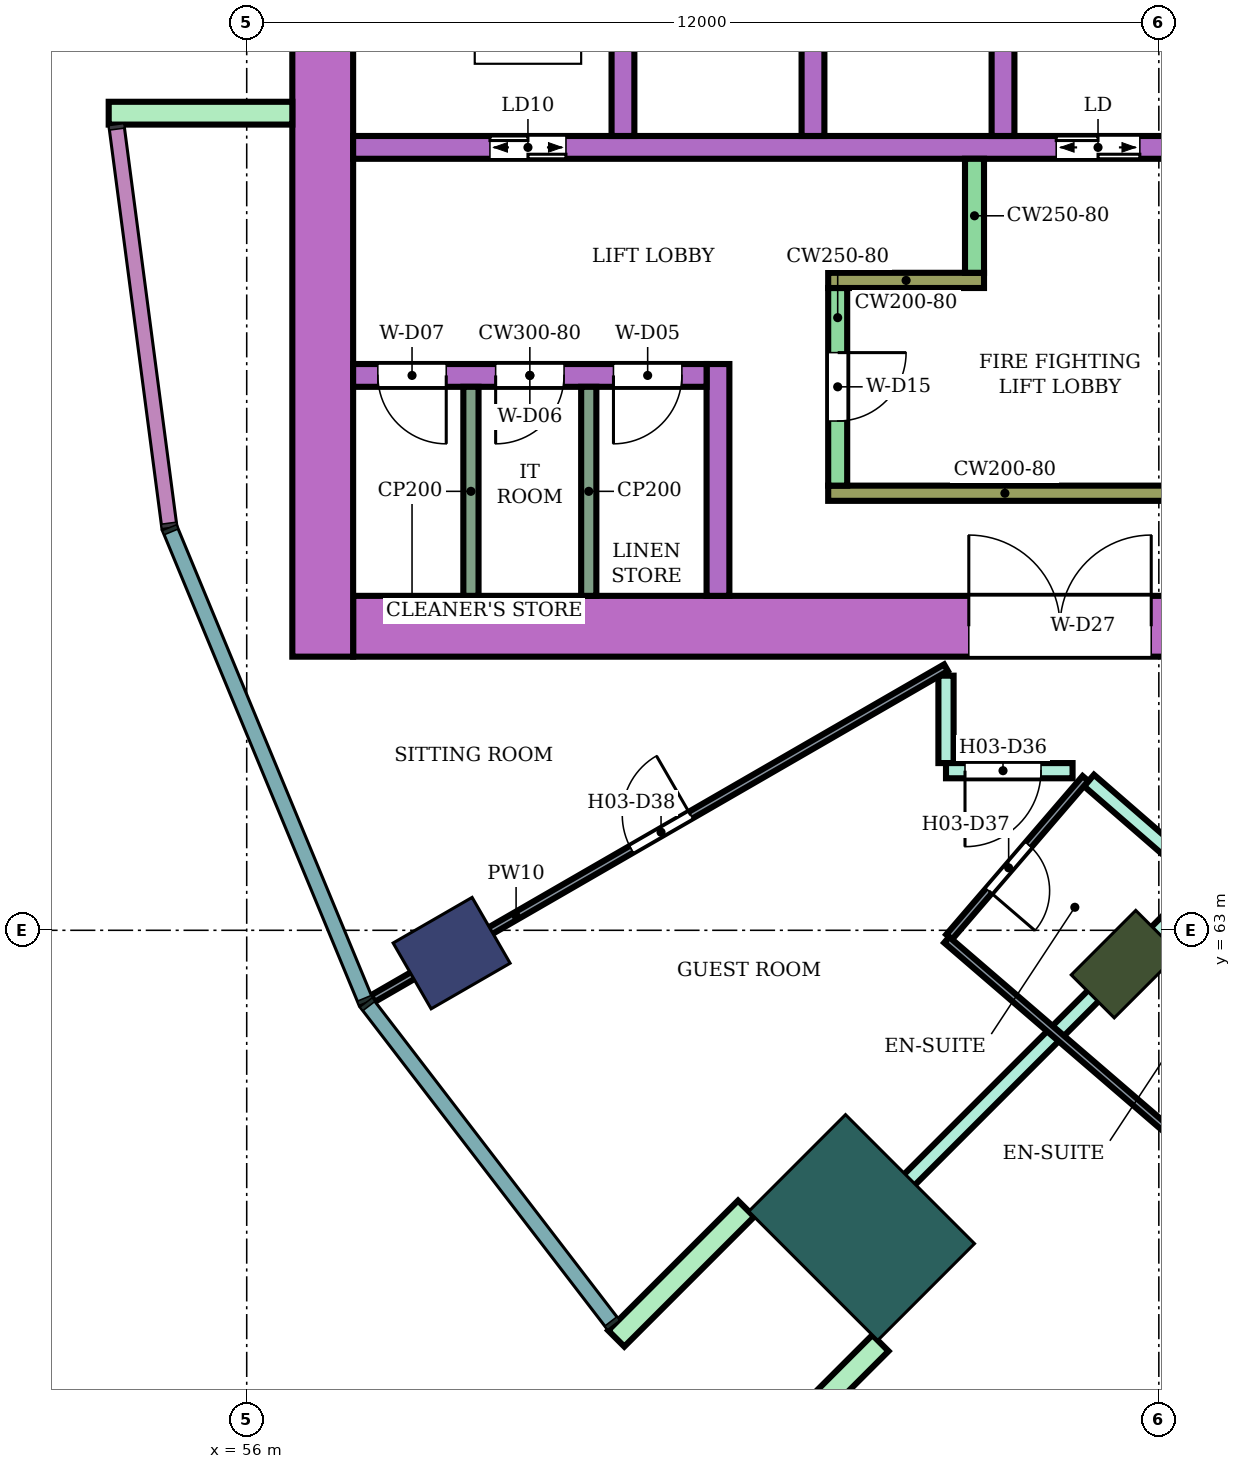
"""IFC4 building model, lengths in metres.
Left out: names, types, materials, properties, quantities, classifications, styles, units other than length and angle.
Written with IfcOpenShell. Run it as: python <this file> out.ifc"""

import sys

from ifc_helpers import new_model, si_unit, direction, frame, frame_2d, origin, origin_2d, place, context, subcontext, project, spatial, rectangle, extrude, element, fill, save


model = new_model("IFC4")
c1 = context("Model", 3, precision=1e-05, world=origin(), true_north=direction((0.0, 1.0)))
c2 = subcontext(c1, "Body", "Model", "MODEL_VIEW")
j1 = project(units=[si_unit("LENGTHUNIT", "METRE"), si_unit("PLANEANGLEUNIT", "RADIAN")], contexts=[c1])
p1 = place(None, origin())
s1 = spatial("IfcSite", under=j1, at=p1, CompositionType="ELEMENT")
p2 = place(p1, origin())
s2 = spatial("IfcBuilding", under=s1, at=p2, CompositionType="ELEMENT")
p3 = place(p2, frame((0.0, 0.0, 59.2)))
s3 = spatial("IfcBuildingStorey", under=s2, at=p3, CompositionType="ELEMENT", Elevation=59.2)
p4 = place(p3, frame((58.696, 62.7, 0.0), z_axis=(0.0, 0.0, 1.0), x_axis=(-0.866025403784, -0.5, 0.0)))
e1 = element("IfcColumn", 1, at=p4, inside=s3, PredefinedType="COLUMN", context=c2, shape_type="SweptSolid", body=[
    extrude(rectangle(XDim=1.2, YDim=1.0, at=origin_2d()), origin(), (0.0, 0.0, 1.0), 3.8),
])
p5 = place(p3, frame((67.555, 62.555, 0.0), z_axis=(0.0, 0.0, 1.0), x_axis=(-0.707106781187, -0.707106781187, 0.0)))
e2 = element("IfcColumn", 2, at=p5, inside=s3, PredefinedType="COLUMN", context=c2, shape_type="SweptSolid", body=[
    extrude(rectangle(XDim=1.2, YDim=0.8, at=origin_2d()), origin(), (0.0, 0.0, 1.0), 3.8),
])
p6 = place(p3, frame((64.09, 59.09, 0.0), z_axis=(0.0, 0.0, 1.0), x_axis=(-0.707106781187, -0.707106781187, 0.0)))
e3 = element("IfcColumn", 3, at=p6, inside=s3, PredefinedType="COLUMN", context=c2, shape_type="SweptSolid", body=[
    extrude(rectangle(XDim=1.8, YDim=2.4, at=origin_2d()), origin(), (0.0, 0.0, 1.0), 3.8),
])
p7 = place(p3, frame((72.1, 67.0, 0.0), z_axis=(0.0, 0.0, 1.0), x_axis=(-1.0, 0.0, 0.0)))
e4 = element("IfcWall", 4, at=p7, inside=s3, PredefinedType="SHEAR", context=c2, shape_type="SweptSolid", body=[
    extrude(rectangle(XDim=14.7, YDim=0.8, at=frame_2d((7.35, 0.0))), origin(), (0.0, 0.0, 1.0), 3.48),
])
p8 = place(p7, frame((4.2, 0.0, 0.0)))
e5 = element("IfcOpeningElement", 5, at=p8, cuts=e4, PredefinedType="OPENING", context=c2, shape_type="SweptSolid", body=[
    extrude(rectangle(XDim=2.4, YDim=2.4, at=frame_2d((1.2, 1.2))), frame((0.0, 0.41, 0.0), z_axis=(0.0, -1.0, 0.0), x_axis=(1.0, 0.0, 0.0)), (0.0, 0.0, 1.0), 0.82),
])
p9 = place(p3, frame((57.0, 83.4, 0.0), z_axis=(0.0, 0.0, 1.0), x_axis=(0.0, -1.0, 0.0)))
e6 = element("IfcWall", 6, at=p9, inside=s3, PredefinedType="SHEAR", context=c2, shape_type="SweptSolid", body=[
    extrude(rectangle(XDim=16.8, YDim=0.8, at=frame_2d((8.4, 0.0))), origin(), (0.0, 0.0, 1.0), 3.48),
])
p10 = place(p3, frame((68.3, 73.3, 0.0), z_axis=(0.0, 0.0, 1.0), x_axis=(-1.0, 0.0, 0.0)))
e7 = element("IfcWall", 7, at=p10, inside=s3, PredefinedType="SHEAR", context=c2, shape_type="SweptSolid", body=[
    extrude(rectangle(XDim=10.9, YDim=0.3, at=frame_2d((5.45, 0.0))), origin(), (0.0, 0.0, 1.0), 3.48),
])
p11 = place(p10, frame((0.55, 0.0, 0.0)))
e8 = element("IfcOpeningElement", 8, at=p11, cuts=e7, PredefinedType="OPENING", context=c2, shape_type="SweptSolid", body=[
    extrude(rectangle(XDim=1.1, YDim=2.1, at=frame_2d((0.55, 1.05))), frame((0.0, 0.16, 0.0), z_axis=(0.0, -1.0, 0.0), x_axis=(1.0, 0.0, 0.0)), (0.0, 0.0, 1.0), 0.32),
])
p12 = place(p10, frame((8.1, 0.0, 0.0)))
e9 = element("IfcOpeningElement", 9, at=p12, cuts=e7, PredefinedType="OPENING", context=c2, shape_type="SweptSolid", body=[
    extrude(rectangle(XDim=1.0, YDim=2.1, at=frame_2d((0.5, 1.05))), frame((0.0, 0.16, 0.0), z_axis=(0.0, -1.0, 0.0), x_axis=(1.0, 0.0, 0.0)), (0.0, 0.0, 1.0), 0.32),
])
for number, where, z_axis, x_axis in (
    (10, (65.95, 76.0, 0.0), (0.0, 0.0, 1.0), (0.0, -1.0, 0.0)),
    (11, (63.45, 76.0, 0.0), (0.0, 0.0, 1.0), (0.0, -1.0, 0.0)),
    (12, (60.95, 76.0, 0.0), (0.0, 0.0, 1.0), (0.0, -1.0, 0.0)),
):
    element("IfcWall", number, at=place(p3, frame(where, z_axis=z_axis, x_axis=x_axis)), inside=s3, PredefinedType="SHEAR", context=c2, shape_type="SweptSolid", body=[
        extrude(rectangle(XDim=2.55, YDim=0.3, at=frame_2d((1.275, 0.0))), origin(), (0.0, 0.0, 1.0), 3.48),
    ])
p13 = place(p3, frame((68.3, 68.75, 0.0), z_axis=(0.0, 0.0, 1.0), x_axis=(-1.0, 0.0, 0.0)))
e13 = element("IfcWall", 13, at=p13, inside=s3, PredefinedType="SHEAR", context=c2, shape_type="SweptSolid", body=[
    extrude(rectangle(XDim=4.65, YDim=0.2, at=frame_2d((2.325, 0.0))), origin(), (0.0, 0.0, 1.0), 3.48),
])
p14 = place(p3, frame((63.775, 71.45, 0.0), z_axis=(0.0, 0.0, 1.0), x_axis=(0.0, -1.0, 0.0)))
e14 = element("IfcWall", 14, at=p14, inside=s3, PredefinedType="SHEAR", context=c2, shape_type="SweptSolid", body=[
    extrude(rectangle(XDim=2.6, YDim=0.25, at=frame_2d((1.3, 0.0))), origin(), (0.0, 0.0, 1.0), 3.48),
])
p15 = place(p14, frame((0.85, 0.0, 0.0)))
e15 = element("IfcOpeningElement", 15, at=p15, cuts=e14, PredefinedType="OPENING", context=c2, shape_type="SweptSolid", body=[
    extrude(rectangle(XDim=0.9, YDim=2.1, at=frame_2d((0.45, 1.05))), frame((0.0, 0.135, 0.0), z_axis=(0.0, -1.0, 0.0), x_axis=(1.0, 0.0, 0.0)), (0.0, 0.0, 1.0), 0.27),
])
p16 = place(p3, frame((65.7, 71.55, 0.0), z_axis=(0.0, 0.0, 1.0), x_axis=(-1.0, 0.0, 0.0)))
e16 = element("IfcWall", 16, at=p16, inside=s3, PredefinedType="SHEAR", context=c2, shape_type="SweptSolid", body=[
    extrude(rectangle(XDim=2.05, YDim=0.2, at=frame_2d((1.025, 0.0))), origin(), (0.0, 0.0, 1.0), 3.48),
])
p17 = place(p3, frame((65.575, 73.15, 0.0), z_axis=(0.0, 0.0, 1.0), x_axis=(0.0, -1.0, 0.0)))
e17 = element("IfcWall", 17, at=p17, inside=s3, PredefinedType="SHEAR", context=c2, shape_type="SweptSolid", body=[
    extrude(rectangle(XDim=1.5, YDim=0.25, at=frame_2d((0.75, 0.0))), origin(), (0.0, 0.0, 1.0), 3.48),
])
p18 = place(p3, frame((62.2, 70.45, 0.0), z_axis=(0.0, 0.0, 1.0), x_axis=(0.0, -1.0, 0.0)))
e18 = element("IfcWall", 18, at=p18, inside=s3, PredefinedType="SHEAR", context=c2, shape_type="SweptSolid", body=[
    extrude(rectangle(XDim=3.05, YDim=0.3, at=frame_2d((1.525, 0.0))), origin(), (0.0, 0.0, 1.0), 3.48),
])
p19 = place(p3, frame((62.05, 70.3, 0.0), z_axis=(0.0, 0.0, 1.0), x_axis=(-1.0, 0.0, 0.0)))
e19 = element("IfcWall", 19, at=p19, inside=s3, PredefinedType="SHEAR", context=c2, shape_type="SweptSolid", body=[
    extrude(rectangle(XDim=4.65, YDim=0.3, at=frame_2d((2.325, 0.0))), origin(), (0.0, 0.0, 1.0), 3.48),
])
p20 = place(p19, frame((0.325, 0.0, 0.0)))
e20 = element("IfcOpeningElement", 20, at=p20, cuts=e19, PredefinedType="OPENING", context=c2, shape_type="SweptSolid", body=[
    extrude(rectangle(XDim=0.9, YDim=2.1, at=frame_2d((0.45, 1.05))), frame((0.0, 0.16, 0.0), z_axis=(0.0, -1.0, 0.0), x_axis=(1.0, 0.0, 0.0)), (0.0, 0.0, 1.0), 0.32),
])
p21 = place(p19, frame((1.875, 0.0, 0.0)))
e21 = element("IfcOpeningElement", 21, at=p21, cuts=e19, PredefinedType="OPENING", context=c2, shape_type="SweptSolid", body=[
    extrude(rectangle(XDim=0.9, YDim=2.1, at=frame_2d((0.45, 1.05))), frame((0.0, 0.16, 0.0), z_axis=(0.0, -1.0, 0.0), x_axis=(1.0, 0.0, 0.0)), (0.0, 0.0, 1.0), 0.32),
])
p22 = place(p19, frame((3.425, 0.0, 0.0)))
e22 = element("IfcOpeningElement", 22, at=p22, cuts=e19, PredefinedType="OPENING", context=c2, shape_type="SweptSolid", body=[
    extrude(rectangle(XDim=0.9, YDim=2.1, at=frame_2d((0.45, 1.05))), frame((0.0, 0.16, 0.0), z_axis=(0.0, -1.0, 0.0), x_axis=(1.0, 0.0, 0.0)), (0.0, 0.0, 1.0), 0.32),
])
for number, where, z_axis, x_axis in (
    (23, (56.6, 73.75, 0.0), (0.0, 0.0, 1.0), (-1.0, 0.0, 0.0)),
    (24, (62.57, 59.338, 0.0), (0.0, 0.0, 1.0), (-0.707, -0.707, 0.0)),
    (25, (64.338, 57.57, 0.0), (0.0, 0.0, 1.0), (-0.707, -0.707, 0.0)),
):
    element("IfcWall", number, at=place(p3, frame(where, z_axis=z_axis, x_axis=x_axis)), inside=s3, PredefinedType="NOTDEFINED", context=c2, shape_type="SweptSolid", body=[
        extrude(rectangle(XDim=2.416, YDim=0.3, at=frame_2d((1.208, 0.0))), origin(), (0.0, 0.0, 1.0), 3.8),
    ])
p23 = place(p3, frame((63.596, 58.596, 0.0), z_axis=(0.0, 0.0, 1.0), x_axis=(0.707106781187, 0.707106781187, 0.0)))
e26 = element("IfcWall", 26, at=p23, inside=s3, PredefinedType="PARTITIONING", context=c2, shape_type="SweptSolid", body=[
    extrude(rectangle(XDim=7.005, YDim=0.2, at=frame_2d((3.503, 0.0))), origin(), (0.0, 0.0, 1.0), 3.35),
])
p24 = place(p3, frame((65.2, 65.2, 0.0), z_axis=(0.0, 0.0, 1.0), x_axis=(0.0, 1.0, 0.0)))
e27 = element("IfcWall", 27, at=p24, inside=s3, PredefinedType="PARTITIONING", context=c2, shape_type="SweptSolid", body=[
    extrude(rectangle(XDim=1.15, YDim=0.2, at=frame_2d((0.575, 0.0))), origin(), (0.0, 0.0, 1.0), 3.35),
])
p25 = place(p3, frame((65.2, 65.1, 0.0), z_axis=(0.0, 0.0, 1.0), x_axis=(1.0, 0.0, 0.0)))
e28 = element("IfcWall", 28, at=p25, inside=s3, PredefinedType="PARTITIONING", context=c2, shape_type="SweptSolid", body=[
    extrude(rectangle(XDim=1.665, YDim=0.2, at=frame_2d((0.833, 0.0))), origin(), (0.0, 0.0, 1.0), 3.35),
])
p26 = place(p25, frame((0.25, 0.0, 0.0)))
e29 = element("IfcOpeningElement", 29, at=p26, cuts=e28, PredefinedType="OPENING", context=c2, shape_type="SweptSolid", body=[
    extrude(rectangle(XDim=1.0, YDim=2.1, at=frame_2d((0.5, 1.05))), frame((0.0, 0.11, 0.0), z_axis=(0.0, -1.0, 0.0), x_axis=(1.0, 0.0, 0.0)), (0.0, 0.0, 1.0), 0.22),
])
p27 = place(p3, frame((67.081, 64.971, 0.0), z_axis=(0.0, 0.0, 1.0), x_axis=(0.755031061605, -0.65568902386, 0.0)))
e30 = element("IfcWall", 30, at=p27, inside=s3, PredefinedType="PARTITIONING", context=c2, shape_type="SweptSolid", body=[
    extrude(rectangle(XDim=6.186, YDim=0.2, at=frame_2d((3.093, 0.0))), origin(), (0.0, 0.0, 1.0), 3.35),
])
p28 = place(p27, frame((4.755, 0.0, 0.0)))
e31 = element("IfcOpeningElement", 31, at=p28, cuts=e30, PredefinedType="OPENING", context=c2, shape_type="SweptSolid", body=[
    extrude(rectangle(XDim=1.0, YDim=2.1, at=frame_2d((0.5, 1.05))), frame((0.0, 0.11, 0.0), z_axis=(0.0, -1.0, 0.0), x_axis=(1.0, 0.0, 0.0)), (0.0, 0.0, 1.0), 0.22),
])
p29 = place(p3, frame((67.095, 52.662, 0.0), z_axis=(0.0, 0.0, 1.0), x_axis=(0.500247659952, 0.865882370021, 0.0)))
e32 = element("IfcWall", 32, at=p29, inside=s3, PredefinedType="PARTITIONING", context=c2, shape_type="SweptSolid", body=[
    extrude(rectangle(XDim=9.375, YDim=0.2, at=frame_2d((4.688, 0.0))), origin(), (0.0, 0.0, 1.0), 3.35),
])
p30 = place(p3, frame((57.659, 62.101, 0.0), z_axis=(0.0, 0.0, 1.0), x_axis=(0.86602264145, 0.500004784474, 0.0)))
e33 = element("IfcWall", 33, at=p30, inside=s3, PredefinedType="PARTITIONING", context=c2, shape_type="SweptSolid", body=[
    extrude(rectangle(XDim=8.708, YDim=0.1, at=frame_2d((4.354, 0.0))), origin(), (0.0, 0.0, 1.0), 3.35),
])
p31 = place(p30, frame((3.929, 0.0, 0.0)))
e34 = element("IfcOpeningElement", 34, at=p31, cuts=e33, PredefinedType="OPENING", context=c2, shape_type="SweptSolid", body=[
    extrude(rectangle(XDim=0.9, YDim=2.1, at=frame_2d((0.45, 1.05))), frame((0.0, 0.06, 0.0), z_axis=(0.0, -1.0, 0.0), x_axis=(1.0, 0.0, 0.0)), (0.0, 0.0, 1.0), 0.12),
])
p32 = place(p3, frame((65.242, 62.912, 0.0), z_axis=(0.0, 0.0, 1.0), x_axis=(0.652069888227, 0.758158862553, 0.0)))
e35 = element("IfcWall", 35, at=p32, inside=s3, PredefinedType="PARTITIONING", context=c2, shape_type="SweptSolid", body=[
    extrude(rectangle(XDim=2.75, YDim=0.1, at=frame_2d((1.375, 0.0))), origin(), (0.0, 0.0, 1.0), 3.35),
])
p33 = place(p32, frame((0.8, 0.0, 0.0)))
e36 = element("IfcOpeningElement", 36, at=p33, cuts=e35, PredefinedType="OPENING", context=c2, shape_type="SweptSolid", body=[
    extrude(rectangle(XDim=0.8, YDim=2.1, at=frame_2d((0.4, 1.05))), frame((0.0, 0.06, 0.0), z_axis=(0.0, -1.0, 0.0), x_axis=(1.0, 0.0, 0.0)), (0.0, 0.0, 1.0), 0.12),
])
p34 = place(p3, frame((65.209, 62.875, 0.0), z_axis=(0.0, 0.0, 1.0), x_axis=(0.757930378138, -0.652335451969, 0.0)))
e37 = element("IfcWall", 37, at=p34, inside=s3, PredefinedType="PARTITIONING", context=c2, shape_type="SweptSolid", body=[
    extrude(rectangle(XDim=4.15, YDim=0.1, at=frame_2d((2.075, 0.0))), origin(), (0.0, 0.0, 1.0), 3.35),
])
for number, where, z_axis, x_axis in (
    (38, (60.5, 70.15, 0.0), (0.0, 0.0, 1.0), (0.0, -1.0, 0.0)),
    (39, (58.95, 70.15, 0.0), (0.0, 0.0, 1.0), (0.0, -1.0, 0.0)),
):
    element("IfcWall", number, at=place(p3, frame(where, z_axis=z_axis, x_axis=x_axis)), inside=s3, PredefinedType="PARTITIONING", context=c2, shape_type="SweptSolid", body=[
        extrude(rectangle(XDim=2.75, YDim=0.2, at=frame_2d((1.375, 0.0))), origin(), (0.0, 0.0, 1.0), 3.48),
    ])
p35 = place(p26, frame((1.0, 0.0, 0.0), z_axis=(0.0, 0.0, 1.0), x_axis=(-1.0, 0.0, 0.0)))
e40 = element("IfcDoor", 40, at=p35, inside=s3, OperationType="SINGLE_SWING_RIGHT", PredefinedType="DOOR", context=c2, shape_type="SweptSolid", body=[
    extrude(rectangle(XDim=1.0, YDim=2.1, at=frame_2d((0.5, 1.05))), frame((0.0, 0.025, 0.0), z_axis=(0.0, -1.0, 0.0), x_axis=(1.0, 0.0, 0.0)), (0.0, 0.0, 1.0), 0.05),
])
fill(e29, e40)
p36 = place(p33, frame((0.8, 0.0, 0.0), z_axis=(0.0, 0.0, 1.0), x_axis=(-1.0, 0.0, 0.0)))
e41 = element("IfcDoor", 41, at=p36, inside=s3, OperationType="SINGLE_SWING_RIGHT", PredefinedType="DOOR", context=c2, shape_type="SweptSolid", body=[
    extrude(rectangle(XDim=0.8, YDim=2.1, at=frame_2d((0.4, 1.05))), frame((0.0, 0.025, 0.0), z_axis=(0.0, -1.0, 0.0), x_axis=(1.0, 0.0, 0.0)), (0.0, 0.0, 1.0), 0.05),
])
fill(e36, e41)
p37 = place(p31, origin())
e42 = element("IfcDoor", 42, at=p37, inside=s3, OperationType="SINGLE_SWING_RIGHT", PredefinedType="DOOR", context=c2, shape_type="SweptSolid", body=[
    extrude(rectangle(XDim=0.9, YDim=2.1, at=frame_2d((0.45, 1.05))), frame((0.0, 0.025, 0.0), z_axis=(0.0, -1.0, 0.0), x_axis=(1.0, 0.0, 0.0)), (0.0, 0.0, 1.0), 0.05),
])
fill(e34, e42)
p38 = place(p11, origin())
e43 = element("IfcDoor", 43, at=p38, inside=s3, OperationType="DOUBLE_DOOR_SLIDING", PredefinedType="DOOR", context=c2, shape_type="SweptSolid", body=[
    extrude(rectangle(XDim=1.1, YDim=2.1, at=frame_2d((0.55, 1.05))), frame((0.0, 0.025, 0.0), z_axis=(0.0, -1.0, 0.0), x_axis=(1.0, 0.0, 0.0)), (0.0, 0.0, 1.0), 0.05),
])
fill(e8, e43)
p39 = place(p12, origin())
e44 = element("IfcDoor", 44, at=p39, inside=s3, OperationType="DOUBLE_DOOR_SLIDING", PredefinedType="DOOR", context=c2, shape_type="SweptSolid", body=[
    extrude(rectangle(XDim=1.0, YDim=2.1, at=frame_2d((0.5, 1.05))), frame((0.0, 0.025, 0.0), z_axis=(0.0, -1.0, 0.0), x_axis=(1.0, 0.0, 0.0)), (0.0, 0.0, 1.0), 0.05),
])
fill(e9, e44)
p40 = place(p15, origin())
e45 = element("IfcDoor", 45, at=p40, inside=s3, OperationType="SINGLE_SWING_LEFT", PredefinedType="DOOR", context=c2, shape_type="SweptSolid", body=[
    extrude(rectangle(XDim=0.9, YDim=2.1, at=frame_2d((0.45, 1.05))), frame((0.0, 0.025, 0.0), z_axis=(0.0, -1.0, 0.0), x_axis=(1.0, 0.0, 0.0)), (0.0, 0.0, 1.0), 0.05),
])
fill(e15, e45)
p41 = place(p20, origin())
e46 = element("IfcDoor", 46, at=p41, inside=s3, OperationType="SINGLE_SWING_RIGHT", PredefinedType="DOOR", context=c2, shape_type="SweptSolid", body=[
    extrude(rectangle(XDim=0.9, YDim=2.1, at=frame_2d((0.45, 1.05))), frame((0.0, 0.025, 0.0), z_axis=(0.0, -1.0, 0.0), x_axis=(1.0, 0.0, 0.0)), (0.0, 0.0, 1.0), 0.05),
])
fill(e20, e46)
p42 = place(p21, origin())
e47 = element("IfcDoor", 47, at=p42, inside=s3, OperationType="SINGLE_SWING_RIGHT", PredefinedType="DOOR", context=c2, shape_type="SweptSolid", body=[
    extrude(rectangle(XDim=0.9, YDim=2.1, at=frame_2d((0.45, 1.05))), frame((0.0, 0.025, 0.0), z_axis=(0.0, -1.0, 0.0), x_axis=(1.0, 0.0, 0.0)), (0.0, 0.0, 1.0), 0.05),
])
fill(e21, e47)
p43 = place(p22, origin())
e48 = element("IfcDoor", 48, at=p43, inside=s3, OperationType="SINGLE_SWING_LEFT", PredefinedType="DOOR", context=c2, shape_type="SweptSolid", body=[
    extrude(rectangle(XDim=0.9, YDim=2.1, at=frame_2d((0.45, 1.05))), frame((0.0, 0.025, 0.0), z_axis=(0.0, -1.0, 0.0), x_axis=(1.0, 0.0, 0.0)), (0.0, 0.0, 1.0), 0.05),
])
fill(e22, e48)
p44 = place(p8, frame((2.4, 0.0, 0.0), z_axis=(0.0, 0.0, 1.0), x_axis=(-1.0, 0.0, 0.0)))
e49 = element("IfcDoor", 49, at=p44, inside=s3, OperationType="DOUBLE_DOOR_SINGLE_SWING", PredefinedType="DOOR", context=c2, shape_type="SweptSolid", body=[
    extrude(rectangle(XDim=2.4, YDim=2.4, at=frame_2d((1.2, 1.2))), frame((0.0, 0.025, 0.0), z_axis=(0.0, -1.0, 0.0), x_axis=(1.0, 0.0, 0.0)), (0.0, 0.0, 1.0), 0.05),
])
fill(e5, e49)
save(model, sys.argv[1])
